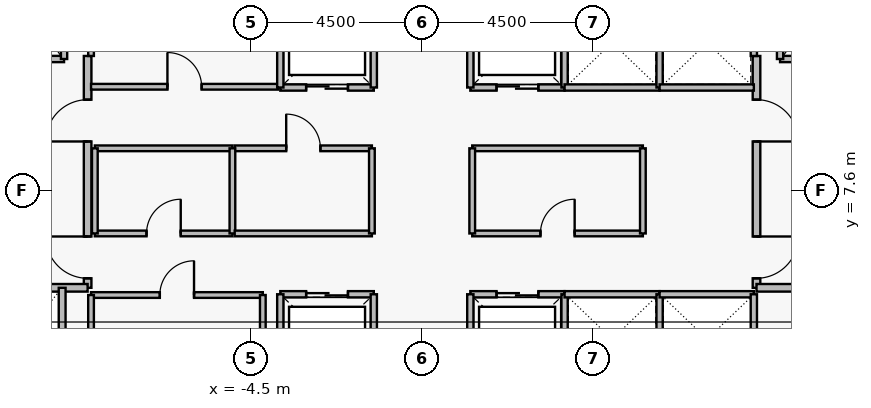
"""IFC4 building model, lengths in metres.
Left out: names, types, materials, properties, quantities, classifications, styles, units other than length and angle.
Written with IfcOpenShell. Run it as: python <this file> out.ifc"""

import sys

from ifc_helpers import new_model, si_unit, direction, frame, frame_2d, origin, place, context, subcontext, project, spatial, rectangle, extrude, element, fill, save


model = new_model("IFC4")
c1 = context("Model", 3, precision=1e-05, world=origin(), true_north=direction((0.0, 1.0)))
c2 = subcontext(c1, "Body", "Model", "MODEL_VIEW")
j1 = project(units=[si_unit("LENGTHUNIT", "METRE"), si_unit("PLANEANGLEUNIT", "RADIAN")], contexts=[c1])
p1 = place(None, origin())
s1 = spatial("IfcSite", under=j1, at=p1, CompositionType="ELEMENT")
p2 = place(p1, origin())
s2 = spatial("IfcBuilding", under=s1, at=p2, CompositionType="ELEMENT")
p3 = place(p2, frame((0.0, 0.0, 203.65)))
s3 = spatial("IfcBuildingStorey", under=s2, at=p3, CompositionType="ELEMENT", Elevation=203.65)
p4 = place(p3, frame((-8.8, 5.05, 0.0), z_axis=(0.0, 0.0, 1.0), x_axis=(0.0, 1.0, 0.0)))
e1 = element("IfcWall", 1, at=p4, inside=s3, PredefinedType="PARTITIONING", context=c2, shape_type="SweptSolid", body=[
    extrude(rectangle(XDim=6.1, YDim=0.2, at=frame_2d((3.05, 0.0))), origin(), (0.0, 0.0, 1.0), 3.53),
])
p5 = place(p4, frame((0.25, 0.0, 0.0)))
e2 = element("IfcOpeningElement", 2, at=p5, cuts=e1, PredefinedType="OPENING", context=c2, shape_type="SweptSolid", body=[
    extrude(rectangle(XDim=1.1, YDim=2.2, at=frame_2d((0.55, 1.1))), frame((0.0, 0.11, 0.0), z_axis=(0.0, -1.0, 0.0), x_axis=(1.0, 0.0, 0.0)), (0.0, 0.0, 1.0), 0.22),
])
p6 = place(p4, frame((3.85, 0.0, 0.0)))
e3 = element("IfcOpeningElement", 3, at=p6, cuts=e1, PredefinedType="OPENING", context=c2, shape_type="SweptSolid", body=[
    extrude(rectangle(XDim=1.1, YDim=2.2, at=frame_2d((0.55, 1.1))), frame((0.0, 0.11, 0.0), z_axis=(0.0, -1.0, 0.0), x_axis=(1.0, 0.0, 0.0)), (0.0, 0.0, 1.0), 0.22),
])
p7 = place(p3, frame((8.8, 11.15, 0.0), z_axis=(0.0, 0.0, 1.0), x_axis=(0.0, -1.0, 0.0)))
e4 = element("IfcWall", 4, at=p7, inside=s3, PredefinedType="PARTITIONING", context=c2, shape_type="SweptSolid", body=[
    extrude(rectangle(XDim=6.1, YDim=0.2, at=frame_2d((3.05, 0.0))), origin(), (0.0, 0.0, 1.0), 3.53),
])
p8 = place(p7, frame((1.15, 0.0, 0.0)))
e5 = element("IfcOpeningElement", 5, at=p8, cuts=e4, PredefinedType="OPENING", context=c2, shape_type="SweptSolid", body=[
    extrude(rectangle(XDim=1.1, YDim=2.2, at=frame_2d((0.55, 1.1))), frame((0.0, 0.11, 0.0), z_axis=(0.0, -1.0, 0.0), x_axis=(1.0, 0.0, 0.0)), (0.0, 0.0, 1.0), 0.22),
])
p9 = place(p7, frame((4.75, 0.0, 0.0)))
e6 = element("IfcOpeningElement", 6, at=p9, cuts=e4, PredefinedType="OPENING", context=c2, shape_type="SweptSolid", body=[
    extrude(rectangle(XDim=1.1, YDim=2.2, at=frame_2d((0.55, 1.1))), frame((0.0, 0.11, 0.0), z_axis=(0.0, -1.0, 0.0), x_axis=(1.0, 0.0, 0.0)), (0.0, 0.0, 1.0), 0.22),
])
p10 = place(p3, frame((-11.58, 11.07, 0.0), z_axis=(0.0, 0.0, 1.0), x_axis=(1.0, 0.0, 0.0)))
e7 = element("IfcWall", 7, at=p10, inside=s3, PredefinedType="PARTITIONING", context=c2, shape_type="SweptSolid", body=[
    extrude(rectangle(XDim=2.16, YDim=0.165, at=frame_2d((1.08, 0.0))), origin(), (0.0, 0.0, 1.0), 3.53),
])
p11 = place(p10, frame((0.53, 0.0, 0.0)))
e8 = element("IfcOpeningElement", 8, at=p11, cuts=e7, PredefinedType="OPENING", context=c2, shape_type="SweptSolid", body=[
    extrude(rectangle(XDim=1.15, YDim=2.25, at=frame_2d((0.575, 1.125))), frame((0.0, 0.093, 0.0), z_axis=(0.0, -1.0, 0.0), x_axis=(1.0, 0.0, 0.0)), (0.0, 0.0, 1.0), 0.185),
])
p12 = place(p3, frame((9.42, 11.07, 0.0), z_axis=(0.0, 0.0, 1.0), x_axis=(1.0, 0.0, 0.0)))
e9 = element("IfcWall", 9, at=p12, inside=s3, PredefinedType="PARTITIONING", context=c2, shape_type="SweptSolid", body=[
    extrude(rectangle(XDim=2.16, YDim=0.165, at=frame_2d((1.08, 0.0))), origin(), (0.0, 0.0, 1.0), 3.53),
])
p13 = place(p12, frame((0.53, 0.0, 0.0)))
e10 = element("IfcOpeningElement", 10, at=p13, cuts=e9, PredefinedType="OPENING", context=c2, shape_type="SweptSolid", body=[
    extrude(rectangle(XDim=1.15, YDim=2.25, at=frame_2d((0.575, 1.125))), frame((0.0, 0.093, 0.0), z_axis=(0.0, -1.0, 0.0), x_axis=(1.0, 0.0, 0.0)), (0.0, 0.0, 1.0), 0.185),
])
p14 = place(p3, frame((-3.73, 4.88, 0.0), z_axis=(0.0, 0.0, 1.0), x_axis=(1.0, 0.0, 0.0)))
e11 = element("IfcWall", 11, at=p14, inside=s3, PredefinedType="PARTITIONING", context=c2, shape_type="SweptSolid", body=[
    extrude(rectangle(XDim=2.46, YDim=0.165, at=frame_2d((1.23, 0.0))), origin(), (0.0, 0.0, 1.0), 3.53),
])
p15 = place(p14, frame((0.68, 0.0, 0.0)))
e12 = element("IfcOpeningElement", 12, at=p15, cuts=e11, PredefinedType="OPENING", context=c2, shape_type="SweptSolid", body=[
    extrude(rectangle(XDim=1.1, YDim=2.25, at=frame_2d((0.55, 1.125))), frame((0.0, 0.093, 0.0), z_axis=(0.0, -1.0, 0.0), x_axis=(1.0, 0.0, 0.0)), (0.0, 0.0, 1.0), 0.185),
])
p16 = place(p3, frame((1.27, 4.88, 0.0), z_axis=(0.0, 0.0, 1.0), x_axis=(1.0, 0.0, 0.0)))
e13 = element("IfcWall", 13, at=p16, inside=s3, PredefinedType="PARTITIONING", context=c2, shape_type="SweptSolid", body=[
    extrude(rectangle(XDim=2.48, YDim=0.165, at=frame_2d((1.24, 0.0))), origin(), (0.0, 0.0, 1.0), 3.53),
])
p17 = place(p16, frame((0.69, 0.0, 0.0)))
e14 = element("IfcOpeningElement", 14, at=p17, cuts=e13, PredefinedType="OPENING", context=c2, shape_type="SweptSolid", body=[
    extrude(rectangle(XDim=1.1, YDim=2.25, at=frame_2d((0.55, 1.125))), frame((0.0, 0.093, 0.0), z_axis=(0.0, -1.0, 0.0), x_axis=(1.0, 0.0, 0.0)), (0.0, 0.0, 1.0), 0.185),
])
p18 = place(p3, frame((-3.73, 10.32, 0.0), z_axis=(0.0, 0.0, 1.0), x_axis=(1.0, 0.0, 0.0)))
e15 = element("IfcWall", 15, at=p18, inside=s3, PredefinedType="PARTITIONING", context=c2, shape_type="SweptSolid", body=[
    extrude(rectangle(XDim=2.46, YDim=0.165, at=frame_2d((1.23, 0.0))), origin(), (0.0, 0.0, 1.0), 3.53),
])
p19 = place(p18, frame((0.68, 0.0, 0.0)))
e16 = element("IfcOpeningElement", 16, at=p19, cuts=e15, PredefinedType="OPENING", context=c2, shape_type="SweptSolid", body=[
    extrude(rectangle(XDim=1.1, YDim=2.25, at=frame_2d((0.55, 1.125))), frame((0.0, 0.093, 0.0), z_axis=(0.0, -1.0, 0.0), x_axis=(1.0, 0.0, 0.0)), (0.0, 0.0, 1.0), 0.185),
])
p20 = place(p3, frame((1.27, 10.32, 0.0), z_axis=(0.0, 0.0, 1.0), x_axis=(1.0, 0.0, 0.0)))
e17 = element("IfcWall", 17, at=p20, inside=s3, PredefinedType="PARTITIONING", context=c2, shape_type="SweptSolid", body=[
    extrude(rectangle(XDim=2.48, YDim=0.165, at=frame_2d((1.24, 0.0))), origin(), (0.0, 0.0, 1.0), 3.53),
])
p21 = place(p20, frame((0.69, 0.0, 0.0)))
e18 = element("IfcOpeningElement", 18, at=p21, cuts=e17, PredefinedType="OPENING", context=c2, shape_type="SweptSolid", body=[
    extrude(rectangle(XDim=1.1, YDim=2.25, at=frame_2d((0.55, 1.125))), frame((0.0, 0.093, 0.0), z_axis=(0.0, -1.0, 0.0), x_axis=(1.0, 0.0, 0.0)), (0.0, 0.0, 1.0), 0.185),
])
p22 = place(p3, frame((-8.71, 4.86, 0.0), z_axis=(0.0, 0.0, 1.0), x_axis=(1.0, 0.0, 0.0)))
e19 = element("IfcWall", 19, at=p22, inside=s3, PredefinedType="PARTITIONING", context=c2, shape_type="SweptSolid", body=[
    extrude(rectangle(XDim=4.52, YDim=0.15, at=frame_2d((2.26, 0.0))), origin(), (0.0, 0.0, 1.0), 3.53),
])
p23 = place(p22, frame((1.81, 0.0, 0.0)))
e20 = element("IfcOpeningElement", 20, at=p23, cuts=e19, PredefinedType="OPENING", context=c2, shape_type="SweptSolid", body=[
    extrude(rectangle(XDim=0.9, YDim=2.15, at=frame_2d((0.45, 1.075))), frame((0.0, 0.085, 0.0), z_axis=(0.0, -1.0, 0.0), x_axis=(1.0, 0.0, 0.0)), (0.0, 0.0, 1.0), 0.17),
])
p24 = place(p3, frame((-8.71, 10.34, 0.0), z_axis=(0.0, 0.0, 1.0), x_axis=(1.0, 0.0, 0.0)))
e21 = element("IfcWall", 21, at=p24, inside=s3, PredefinedType="PARTITIONING", context=c2, shape_type="SweptSolid", body=[
    extrude(rectangle(XDim=4.92, YDim=0.15, at=frame_2d((2.46, 0.0))), origin(), (0.0, 0.0, 1.0), 3.53),
])
p25 = place(p24, frame((2.01, 0.0, 0.0)))
e22 = element("IfcOpeningElement", 22, at=p25, cuts=e21, PredefinedType="OPENING", context=c2, shape_type="SweptSolid", body=[
    extrude(rectangle(XDim=0.9, YDim=2.15, at=frame_2d((0.45, 1.075))), frame((0.0, 0.085, 0.0), z_axis=(0.0, -1.0, 0.0), x_axis=(1.0, 0.0, 0.0)), (0.0, 0.0, 1.0), 0.17),
])
p26 = place(p3, frame((-8.61, 6.48, 0.0), z_axis=(0.0, 0.0, 1.0), x_axis=(1.0, 0.0, 0.0)))
e23 = element("IfcWall", 23, at=p26, inside=s3, PredefinedType="PARTITIONING", context=c2, shape_type="SweptSolid", body=[
    extrude(rectangle(XDim=3.62, YDim=0.15, at=frame_2d((1.81, 0.0))), origin(), (0.0, 0.0, 1.0), 3.53),
])
p27 = place(p26, frame((1.36, 0.0, 0.0)))
e24 = element("IfcOpeningElement", 24, at=p27, cuts=e23, PredefinedType="OPENING", context=c2, shape_type="SweptSolid", body=[
    extrude(rectangle(XDim=0.9, YDim=2.15, at=frame_2d((0.45, 1.075))), frame((0.0, 0.085, 0.0), z_axis=(0.0, -1.0, 0.0), x_axis=(1.0, 0.0, 0.0)), (0.0, 0.0, 1.0), 0.17),
])
p28 = place(p3, frame((-4.93, 8.72, 0.0), z_axis=(0.0, 0.0, 1.0), x_axis=(1.0, 0.0, 0.0)))
e25 = element("IfcWall", 25, at=p28, inside=s3, PredefinedType="PARTITIONING", context=c2, shape_type="SweptSolid", body=[
    extrude(rectangle(XDim=3.61, YDim=0.15, at=frame_2d((1.805, 0.0))), origin(), (0.0, 0.0, 1.0), 3.53),
])
p29 = place(p28, frame((1.355, 0.0, 0.0)))
e26 = element("IfcOpeningElement", 26, at=p29, cuts=e25, PredefinedType="OPENING", context=c2, shape_type="SweptSolid", body=[
    extrude(rectangle(XDim=0.9, YDim=2.15, at=frame_2d((0.45, 1.075))), frame((0.0, 0.085, 0.0), z_axis=(0.0, -1.0, 0.0), x_axis=(1.0, 0.0, 0.0)), (0.0, 0.0, 1.0), 0.17),
])
p30 = place(p3, frame((1.32, 6.48, 0.0), z_axis=(0.0, 0.0, 1.0), x_axis=(1.0, 0.0, 0.0)))
e27 = element("IfcWall", 27, at=p30, inside=s3, PredefinedType="PARTITIONING", context=c2, shape_type="SweptSolid", body=[
    extrude(rectangle(XDim=4.49, YDim=0.15, at=frame_2d((2.245, 0.0))), origin(), (0.0, 0.0, 1.0), 3.53),
])
p31 = place(p30, frame((1.795, 0.0, 0.0)))
e28 = element("IfcOpeningElement", 28, at=p31, cuts=e27, PredefinedType="OPENING", context=c2, shape_type="SweptSolid", body=[
    extrude(rectangle(XDim=0.9, YDim=2.15, at=frame_2d((0.45, 1.075))), frame((0.0, 0.085, 0.0), z_axis=(0.0, -1.0, 0.0), x_axis=(1.0, 0.0, 0.0)), (0.0, 0.0, 1.0), 0.17),
])
for number, where, z_axis, x_axis in (
    (29, (-11.65, 5.05, 0.0), (0.0, 0.0, 1.0), (1.0, 0.0, 0.0)),
    (30, (8.8, 5.05, 0.0), (0.0, 0.0, 1.0), (1.0, 0.0, 0.0)),
):
    element("IfcWall", number, at=place(p3, frame(where, z_axis=z_axis, x_axis=x_axis)), inside=s3, PredefinedType="PARTITIONING", context=c2, shape_type="SweptSolid", body=[
        extrude(rectangle(XDim=2.85, YDim=0.2, at=frame_2d((1.425, 0.0))), origin(), (0.0, 0.0, 1.0), 3.53),
    ])
for number, where, z_axis, x_axis in (
    (31, (-9.42, 11.07, 0.0), (0.0, 0.0, 1.0), (0.0, 1.0, 0.0)),
    (32, (9.42, 11.07, 0.0), (0.0, 0.0, 1.0), (0.0, 1.0, 0.0)),
):
    element("IfcWall", number, at=place(p3, frame(where, z_axis=z_axis, x_axis=x_axis)), inside=s3, PredefinedType="PARTITIONING", context=c2, shape_type="SweptSolid", body=[
        extrude(rectangle(XDim=2.96, YDim=0.165, at=frame_2d((1.48, 0.0))), origin(), (0.0, 0.0, 1.0), 3.53),
    ])
for number, where, z_axis, x_axis in (
    (33, (-3.73, 2.52, 0.0), (0.0, 0.0, 1.0), (0.0, 1.0, 0.0)),
    (34, (-1.27, 2.52, 0.0), (0.0, 0.0, 1.0), (0.0, 1.0, 0.0)),
    (35, (1.27, 2.52, 0.0), (0.0, 0.0, 1.0), (0.0, 1.0, 0.0)),
    (36, (3.75, 2.52, 0.0), (0.0, 0.0, 1.0), (0.0, 1.0, 0.0)),
    (37, (-3.73, 10.32, 0.0), (0.0, 0.0, 1.0), (0.0, 1.0, 0.0)),
    (38, (-1.27, 10.32, 0.0), (0.0, 0.0, 1.0), (0.0, 1.0, 0.0)),
    (39, (1.27, 10.32, 0.0), (0.0, 0.0, 1.0), (0.0, 1.0, 0.0)),
    (40, (3.75, 10.32, 0.0), (0.0, 0.0, 1.0), (0.0, 1.0, 0.0)),
):
    element("IfcWall", number, at=place(p3, frame(where, z_axis=z_axis, x_axis=x_axis)), inside=s3, PredefinedType="PARTITIONING", context=c2, shape_type="SweptSolid", body=[
        extrude(rectangle(XDim=2.36, YDim=0.165, at=frame_2d((1.18, 0.0))), origin(), (0.0, 0.0, 1.0), 3.53),
    ])
p32 = place(p3, frame((3.75, 4.88, 0.0), z_axis=(0.0, 0.0, 1.0), x_axis=(1.0, 0.0, 0.0)))
e41 = element("IfcWall", 41, at=p32, inside=s3, PredefinedType="PARTITIONING", context=c2, shape_type="SweptSolid", body=[
    extrude(rectangle(XDim=2.5, YDim=0.165, at=frame_2d((1.25, 0.0))), origin(), (0.0, 0.0, 1.0), 3.53),
])
p33 = place(p3, frame((6.25, 2.52, 0.0), z_axis=(0.0, 0.0, 1.0), x_axis=(0.0, 1.0, 0.0)))
e42 = element("IfcWall", 42, at=p33, inside=s3, PredefinedType="PARTITIONING", context=c2, shape_type="SweptSolid", body=[
    extrude(rectangle(XDim=2.36, YDim=0.165, at=frame_2d((1.18, 0.0))), origin(), (0.0, 0.0, 1.0), 3.53),
])
p34 = place(p3, frame((6.25, 4.88, 0.0), z_axis=(0.0, 0.0, 1.0), x_axis=(1.0, 0.0, 0.0)))
e43 = element("IfcWall", 43, at=p34, inside=s3, PredefinedType="PARTITIONING", context=c2, shape_type="SweptSolid", body=[
    extrude(rectangle(XDim=2.48, YDim=0.165, at=frame_2d((1.24, 0.0))), origin(), (0.0, 0.0, 1.0), 3.53),
])
p35 = place(p3, frame((8.73, 2.52, 0.0), z_axis=(0.0, 0.0, 1.0), x_axis=(0.0, 1.0, 0.0)))
e44 = element("IfcWall", 44, at=p35, inside=s3, PredefinedType="PARTITIONING", context=c2, shape_type="SweptSolid", body=[
    extrude(rectangle(XDim=2.36, YDim=0.165, at=frame_2d((1.18, 0.0))), origin(), (0.0, 0.0, 1.0), 3.53),
])
p36 = place(p3, frame((3.75, 10.32, 0.0), z_axis=(0.0, 0.0, 1.0), x_axis=(1.0, 0.0, 0.0)))
e45 = element("IfcWall", 45, at=p36, inside=s3, PredefinedType="PARTITIONING", context=c2, shape_type="SweptSolid", body=[
    extrude(rectangle(XDim=2.5, YDim=0.165, at=frame_2d((1.25, 0.0))), origin(), (0.0, 0.0, 1.0), 3.53),
])
p37 = place(p3, frame((6.25, 10.32, 0.0), z_axis=(0.0, 0.0, 1.0), x_axis=(0.0, 1.0, 0.0)))
e46 = element("IfcWall", 46, at=p37, inside=s3, PredefinedType="PARTITIONING", context=c2, shape_type="SweptSolid", body=[
    extrude(rectangle(XDim=2.36, YDim=0.165, at=frame_2d((1.18, 0.0))), origin(), (0.0, 0.0, 1.0), 3.53),
])
p38 = place(p3, frame((6.25, 10.32, 0.0), z_axis=(0.0, 0.0, 1.0), x_axis=(1.0, 0.0, 0.0)))
e47 = element("IfcWall", 47, at=p38, inside=s3, PredefinedType="PARTITIONING", context=c2, shape_type="SweptSolid", body=[
    extrude(rectangle(XDim=2.48, YDim=0.165, at=frame_2d((1.24, 0.0))), origin(), (0.0, 0.0, 1.0), 3.53),
])
p39 = place(p3, frame((8.73, 11.15, 0.0), z_axis=(0.0, 0.0, 1.0), x_axis=(0.0, 1.0, 0.0)))
e48 = element("IfcWall", 48, at=p39, inside=s3, PredefinedType="PARTITIONING", context=c2, shape_type="SweptSolid", body=[
    extrude(rectangle(XDim=1.53, YDim=0.165, at=frame_2d((0.765, 0.0))), origin(), (0.0, 0.0, 1.0), 3.53),
])
for number, where, z_axis, x_axis in (
    (49, (-8.71, 2.49, 0.0), (0.0, 0.0, 1.0), (0.0, 1.0, 0.0)),
    (50, (-4.19, 2.49, 0.0), (0.0, 0.0, 1.0), (0.0, 1.0, 0.0)),
):
    element("IfcWall", number, at=place(p3, frame(where, z_axis=z_axis, x_axis=x_axis)), inside=s3, PredefinedType="PARTITIONING", context=c2, shape_type="SweptSolid", body=[
        extrude(rectangle(XDim=2.37, YDim=0.15, at=frame_2d((1.185, 0.0))), origin(), (0.0, 0.0, 1.0), 3.53),
    ])
p40 = place(p3, frame((-8.71, 11.15, 0.0), z_axis=(0.0, 0.0, 1.0), x_axis=(0.0, 1.0, 0.0)))
e51 = element("IfcWall", 51, at=p40, inside=s3, PredefinedType="PARTITIONING", context=c2, shape_type="SweptSolid", body=[
    extrude(rectangle(XDim=1.71, YDim=0.15, at=frame_2d((0.855, 0.0))), origin(), (0.0, 0.0, 1.0), 3.53),
])
p41 = place(p3, frame((-9.47, 2.45, 0.0), z_axis=(0.0, 0.0, 1.0), x_axis=(0.0, 1.0, 0.0)))
e52 = element("IfcWall", 52, at=p41, inside=s3, PredefinedType="PARTITIONING", context=c2, shape_type="SweptSolid", body=[
    extrude(rectangle(XDim=2.6, YDim=0.18, at=frame_2d((1.3, 0.0))), origin(), (0.0, 0.0, 1.0), 3.53),
])
p42 = place(p3, frame((-8.61, 8.72, 0.0), z_axis=(0.0, 0.0, 1.0), x_axis=(1.0, 0.0, 0.0)))
e53 = element("IfcWall", 53, at=p42, inside=s3, PredefinedType="PARTITIONING", context=c2, shape_type="SweptSolid", body=[
    extrude(rectangle(XDim=3.62, YDim=0.15, at=frame_2d((1.81, 0.0))), origin(), (0.0, 0.0, 1.0), 3.53),
])
for number, where, z_axis, x_axis in (
    (54, (-8.61, 6.48, 0.0), (0.0, 0.0, 1.0), (0.0, 1.0, 0.0)),
    (55, (-4.99, 6.48, 0.0), (0.0, 0.0, 1.0), (0.0, 1.0, 0.0)),
):
    element("IfcWall", number, at=place(p3, frame(where, z_axis=z_axis, x_axis=x_axis)), inside=s3, PredefinedType="PARTITIONING", context=c2, shape_type="SweptSolid", body=[
        extrude(rectangle(XDim=2.24, YDim=0.15, at=frame_2d((1.12, 0.0))), origin(), (0.0, 0.0, 1.0), 3.53),
    ])
p43 = place(p3, frame((-4.93, 6.48, 0.0), z_axis=(0.0, 0.0, 1.0), x_axis=(1.0, 0.0, 0.0)))
e56 = element("IfcWall", 56, at=p43, inside=s3, PredefinedType="PARTITIONING", context=c2, shape_type="SweptSolid", body=[
    extrude(rectangle(XDim=3.61, YDim=0.15, at=frame_2d((1.805, 0.0))), origin(), (0.0, 0.0, 1.0), 3.53),
])
p44 = place(p3, frame((-1.32, 6.48, 0.0), z_axis=(0.0, 0.0, 1.0), x_axis=(0.0, 1.0, 0.0)))
e57 = element("IfcWall", 57, at=p44, inside=s3, PredefinedType="PARTITIONING", context=c2, shape_type="SweptSolid", body=[
    extrude(rectangle(XDim=2.24, YDim=0.15, at=frame_2d((1.12, 0.0))), origin(), (0.0, 0.0, 1.0), 3.53),
])
p45 = place(p3, frame((1.32, 8.72, 0.0), z_axis=(0.0, 0.0, 1.0), x_axis=(1.0, 0.0, 0.0)))
e58 = element("IfcWall", 58, at=p45, inside=s3, PredefinedType="PARTITIONING", context=c2, shape_type="SweptSolid", body=[
    extrude(rectangle(XDim=4.49, YDim=0.15, at=frame_2d((2.245, 0.0))), origin(), (0.0, 0.0, 1.0), 3.53),
])
for number, where, z_axis, x_axis in (
    (59, (1.32, 6.48, 0.0), (0.0, 0.0, 1.0), (0.0, 1.0, 0.0)),
    (60, (5.81, 6.48, 0.0), (0.0, 0.0, 1.0), (0.0, 1.0, 0.0)),
):
    element("IfcWall", number, at=place(p3, frame(where, z_axis=z_axis, x_axis=x_axis)), inside=s3, PredefinedType="PARTITIONING", context=c2, shape_type="SweptSolid", body=[
        extrude(rectangle(XDim=2.24, YDim=0.15, at=frame_2d((1.12, 0.0))), origin(), (0.0, 0.0, 1.0), 3.53),
    ])
p46 = place(p5, origin())
e61 = element("IfcDoor", 61, at=p46, inside=s3, OperationType="SINGLE_SWING_RIGHT", PredefinedType="DOOR", context=c2, shape_type="SweptSolid", body=[
    extrude(rectangle(XDim=1.1, YDim=2.2, at=frame_2d((0.55, 1.1))), frame((0.0, 0.025, 0.0), z_axis=(0.0, -1.0, 0.0), x_axis=(1.0, 0.0, 0.0)), (0.0, 0.0, 1.0), 0.05),
])
fill(e2, e61)
p47 = place(p6, origin())
e62 = element("IfcDoor", 62, at=p47, inside=s3, OperationType="SINGLE_SWING_LEFT", PredefinedType="DOOR", context=c2, shape_type="SweptSolid", body=[
    extrude(rectangle(XDim=1.1, YDim=2.2, at=frame_2d((0.55, 1.1))), frame((0.0, 0.025, 0.0), z_axis=(0.0, -1.0, 0.0), x_axis=(1.0, 0.0, 0.0)), (0.0, 0.0, 1.0), 0.05),
])
fill(e3, e62)
p48 = place(p8, origin())
e63 = element("IfcDoor", 63, at=p48, inside=s3, OperationType="SINGLE_SWING_RIGHT", PredefinedType="DOOR", context=c2, shape_type="SweptSolid", body=[
    extrude(rectangle(XDim=1.1, YDim=2.2, at=frame_2d((0.55, 1.1))), frame((0.0, 0.025, 0.0), z_axis=(0.0, -1.0, 0.0), x_axis=(1.0, 0.0, 0.0)), (0.0, 0.0, 1.0), 0.05),
])
fill(e5, e63)
p49 = place(p9, origin())
e64 = element("IfcDoor", 64, at=p49, inside=s3, OperationType="SINGLE_SWING_LEFT", PredefinedType="DOOR", context=c2, shape_type="SweptSolid", body=[
    extrude(rectangle(XDim=1.1, YDim=2.2, at=frame_2d((0.55, 1.1))), frame((0.0, 0.025, 0.0), z_axis=(0.0, -1.0, 0.0), x_axis=(1.0, 0.0, 0.0)), (0.0, 0.0, 1.0), 0.05),
])
fill(e6, e64)
p50 = place(p15, origin())
e65 = element("IfcDoor", 65, at=p50, inside=s3, OperationType="SLIDING_TO_LEFT", PredefinedType="DOOR", context=c2, shape_type="SweptSolid", body=[
    extrude(rectangle(XDim=1.1, YDim=2.25, at=frame_2d((0.55, 1.125))), frame((0.0, 0.025, 0.0), z_axis=(0.0, -1.0, 0.0), x_axis=(1.0, 0.0, 0.0)), (0.0, 0.0, 1.0), 0.05),
])
fill(e12, e65)
p51 = place(p17, origin())
e66 = element("IfcDoor", 66, at=p51, inside=s3, OperationType="SLIDING_TO_LEFT", PredefinedType="DOOR", context=c2, shape_type="SweptSolid", body=[
    extrude(rectangle(XDim=1.1, YDim=2.25, at=frame_2d((0.55, 1.125))), frame((0.0, 0.025, 0.0), z_axis=(0.0, -1.0, 0.0), x_axis=(1.0, 0.0, 0.0)), (0.0, 0.0, 1.0), 0.05),
])
fill(e14, e66)
p52 = place(p19, origin())
e67 = element("IfcDoor", 67, at=p52, inside=s3, OperationType="SLIDING_TO_LEFT", PredefinedType="DOOR", context=c2, shape_type="SweptSolid", body=[
    extrude(rectangle(XDim=1.1, YDim=2.25, at=frame_2d((0.55, 1.125))), frame((0.0, 0.025, 0.0), z_axis=(0.0, -1.0, 0.0), x_axis=(1.0, 0.0, 0.0)), (0.0, 0.0, 1.0), 0.05),
])
fill(e16, e67)
p53 = place(p21, origin())
e68 = element("IfcDoor", 68, at=p53, inside=s3, OperationType="SLIDING_TO_LEFT", PredefinedType="DOOR", context=c2, shape_type="SweptSolid", body=[
    extrude(rectangle(XDim=1.1, YDim=2.25, at=frame_2d((0.55, 1.125))), frame((0.0, 0.025, 0.0), z_axis=(0.0, -1.0, 0.0), x_axis=(1.0, 0.0, 0.0)), (0.0, 0.0, 1.0), 0.05),
])
fill(e18, e68)
p54 = place(p23, origin())
e69 = element("IfcDoor", 69, at=p54, inside=s3, OperationType="SINGLE_SWING_RIGHT", PredefinedType="DOOR", context=c2, shape_type="SweptSolid", body=[
    extrude(rectangle(XDim=0.9, YDim=2.15, at=frame_2d((0.45, 1.075))), frame((0.0, 0.025, 0.0), z_axis=(0.0, -1.0, 0.0), x_axis=(1.0, 0.0, 0.0)), (0.0, 0.0, 1.0), 0.05),
])
fill(e20, e69)
p55 = place(p25, origin())
e70 = element("IfcDoor", 70, at=p55, inside=s3, OperationType="SINGLE_SWING_LEFT", PredefinedType="DOOR", context=c2, shape_type="SweptSolid", body=[
    extrude(rectangle(XDim=0.9, YDim=2.15, at=frame_2d((0.45, 1.075))), frame((0.0, 0.025, 0.0), z_axis=(0.0, -1.0, 0.0), x_axis=(1.0, 0.0, 0.0)), (0.0, 0.0, 1.0), 0.05),
])
fill(e22, e70)
p56 = place(p27, origin())
e71 = element("IfcDoor", 71, at=p56, inside=s3, OperationType="SINGLE_SWING_RIGHT", PredefinedType="DOOR", context=c2, shape_type="SweptSolid", body=[
    extrude(rectangle(XDim=0.9, YDim=2.15, at=frame_2d((0.45, 1.075))), frame((0.0, 0.025, 0.0), z_axis=(0.0, -1.0, 0.0), x_axis=(1.0, 0.0, 0.0)), (0.0, 0.0, 1.0), 0.05),
])
fill(e24, e71)
p57 = place(p29, origin())
e72 = element("IfcDoor", 72, at=p57, inside=s3, OperationType="SINGLE_SWING_LEFT", PredefinedType="DOOR", context=c2, shape_type="SweptSolid", body=[
    extrude(rectangle(XDim=0.9, YDim=2.15, at=frame_2d((0.45, 1.075))), frame((0.0, 0.025, 0.0), z_axis=(0.0, -1.0, 0.0), x_axis=(1.0, 0.0, 0.0)), (0.0, 0.0, 1.0), 0.05),
])
fill(e26, e72)
p58 = place(p31, origin())
e73 = element("IfcDoor", 73, at=p58, inside=s3, OperationType="SINGLE_SWING_RIGHT", PredefinedType="DOOR", context=c2, shape_type="SweptSolid", body=[
    extrude(rectangle(XDim=0.9, YDim=2.15, at=frame_2d((0.45, 1.075))), frame((0.0, 0.025, 0.0), z_axis=(0.0, -1.0, 0.0), x_axis=(1.0, 0.0, 0.0)), (0.0, 0.0, 1.0), 0.05),
])
fill(e28, e73)
save(model, sys.argv[1])
